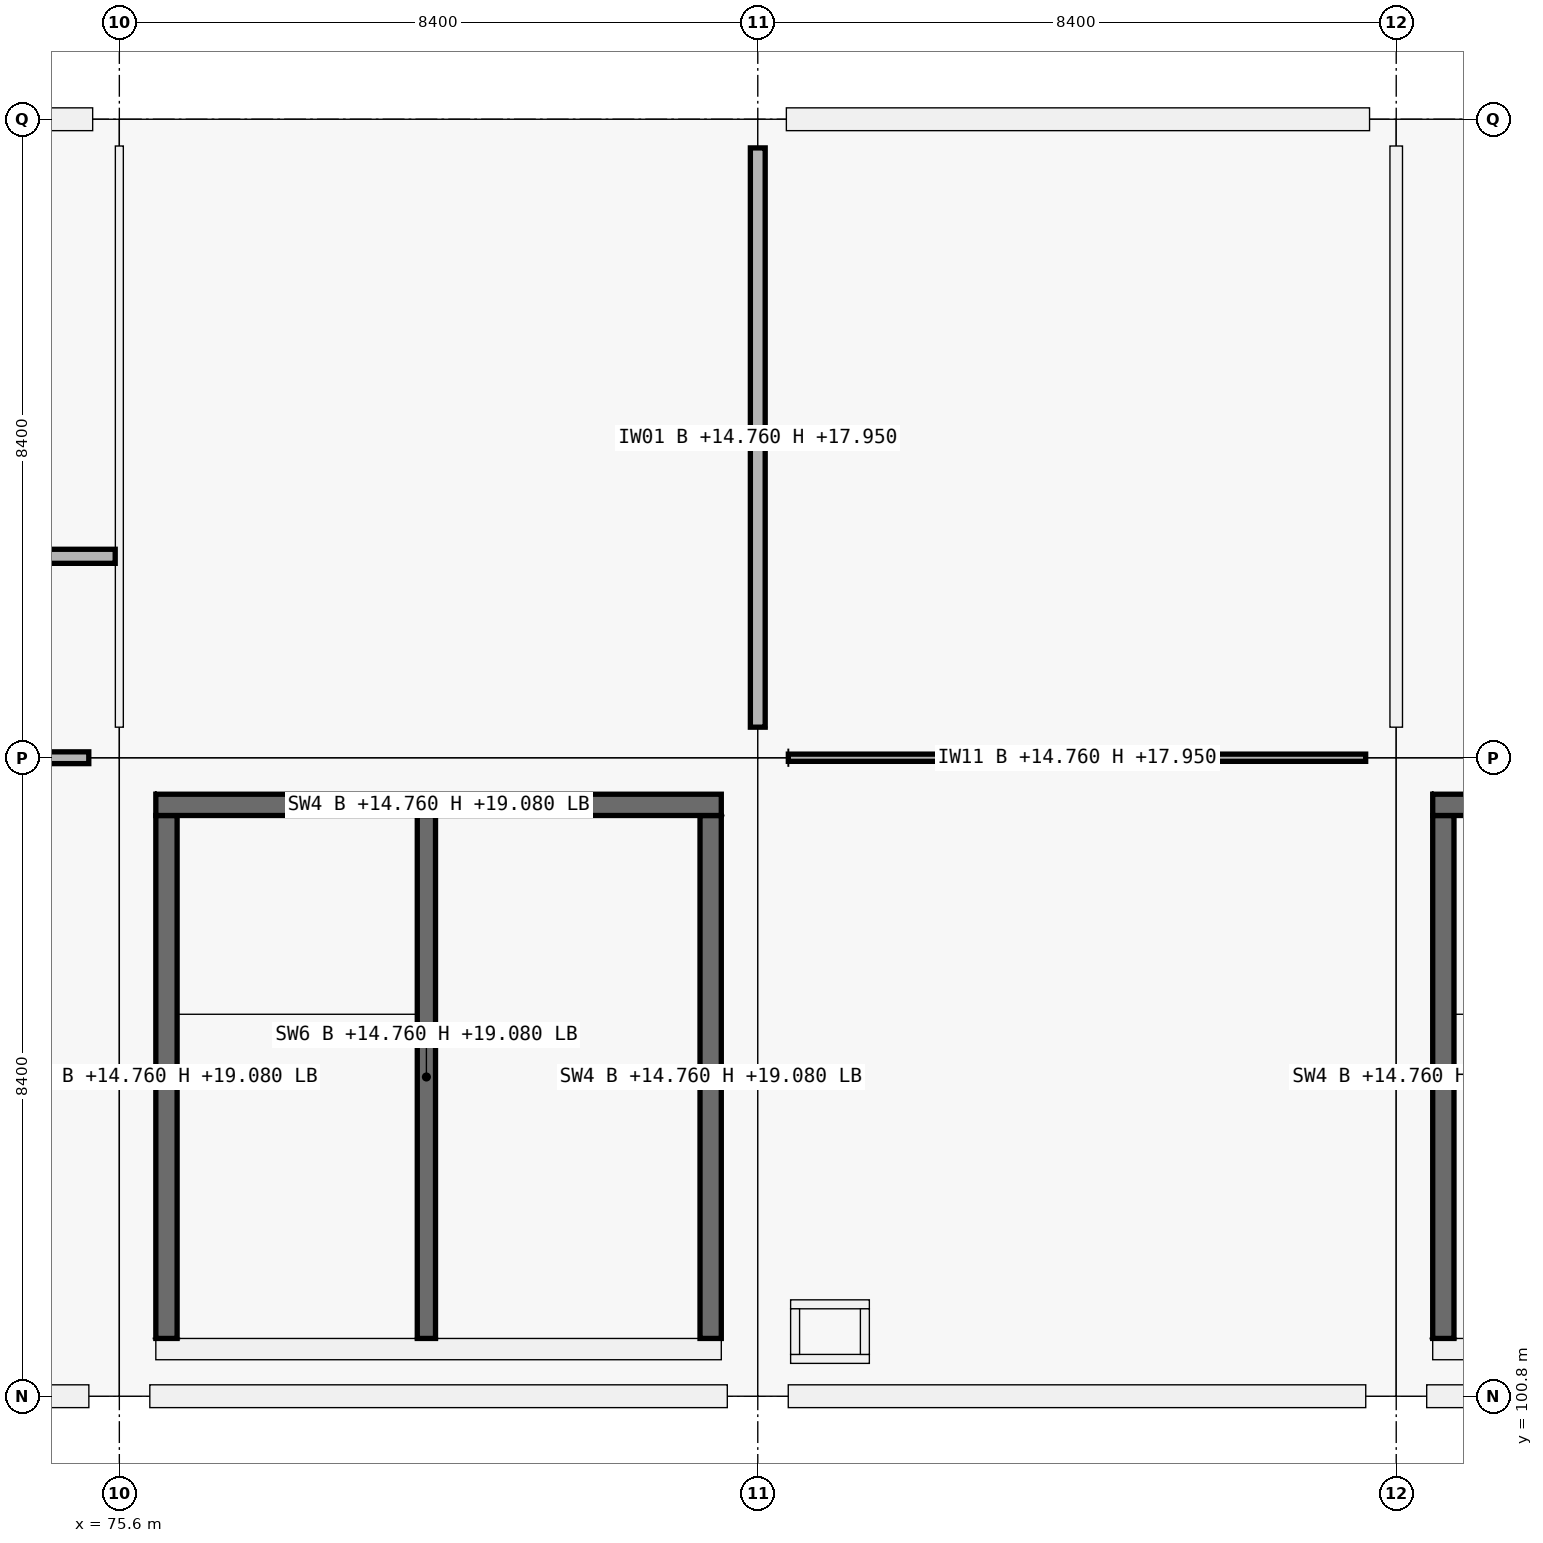
"""IFC4 building model, lengths in metres.
Left out: names, types, materials, properties, quantities, classifications, styles, units other than length and angle.
Written with IfcOpenShell. Run it as: python <this file> out.ifc"""

import sys

from ifc_helpers import new_model, si_unit, direction, frame, frame_2d, origin, origin_2d, place, context, subcontext, project, spatial, rectangle, extrude, element, fill, save


model = new_model("IFC4")
c1 = context("Model", 3, precision=1e-05, world=origin(), true_north=direction((0.0, 1.0)))
c2 = subcontext(c1, "Body", "Model", "MODEL_VIEW")
j1 = project(units=[si_unit("LENGTHUNIT", "METRE"), si_unit("PLANEANGLEUNIT", "RADIAN")], contexts=[c1])
p1 = place(None, origin())
s1 = spatial("IfcSite", under=j1, at=p1, CompositionType="ELEMENT")
p2 = place(p1, origin())
s2 = spatial("IfcBuilding", under=s1, at=p2, CompositionType="ELEMENT")
p3 = place(p2, frame((0.0, 0.0, 14.76)))
s3 = spatial("IfcBuildingStorey", under=s2, at=p3, CompositionType="ELEMENT", Elevation=14.76)
for number, where, z_axis, x_axis in (
    (1, (75.6, 100.8, 0.0), (0.0, 0.0, 1.0), (1.0, 0.0, 0.0)),
    (2, (75.6, 109.2, 0.0), (0.0, 0.0, 1.0), (1.0, 0.0, 0.0)),
):
    element("IfcColumn", number, at=place(p3, frame(where, z_axis=z_axis, x_axis=x_axis)), inside=s3, PredefinedType="COLUMN", context=c2, shape_type="SweptSolid", body=[
        extrude(rectangle(XDim=0.8, YDim=0.8, at=origin_2d()), origin(), (0.0, 0.0, 1.0), 4.32),
    ])
p4 = place(p3, frame((75.6, 117.6, 0.0), z_axis=(0.0, 0.0, 1.0), x_axis=(1.0, 0.0, 0.0)))
e3 = element("IfcColumn", 3, at=p4, inside=s3, PredefinedType="COLUMN", context=c2, shape_type="SweptSolid", body=[
    extrude(rectangle(XDim=0.7, YDim=0.7, at=origin_2d()), origin(), (0.0, 0.0, 1.0), 4.32),
])
for number, where, z_axis, x_axis in (
    (4, (84.0, 100.8, 0.0), (0.0, 0.0, 1.0), (1.0, 0.0, 0.0)),
    (5, (84.0, 109.2, 0.0), (0.0, 0.0, 1.0), (1.0, 0.0, 0.0)),
):
    element("IfcColumn", number, at=place(p3, frame(where, z_axis=z_axis, x_axis=x_axis)), inside=s3, PredefinedType="COLUMN", context=c2, shape_type="SweptSolid", body=[
        extrude(rectangle(XDim=0.8, YDim=0.8, at=origin_2d()), origin(), (0.0, 0.0, 1.0), 4.32),
    ])
p5 = place(p3, frame((84.0, 117.6, 0.0), z_axis=(0.0, 0.0, 1.0), x_axis=(1.0, 0.0, 0.0)))
e6 = element("IfcColumn", 6, at=p5, inside=s3, PredefinedType="COLUMN", context=c2, shape_type="SweptSolid", body=[
    extrude(rectangle(XDim=0.75, YDim=0.75, at=origin_2d()), origin(), (0.0, 0.0, 1.0), 4.32),
])
for number, where, z_axis, x_axis in (
    (7, (92.4, 100.8, 0.0), (0.0, 0.0, 1.0), (1.0, 0.0, 0.0)),
    (8, (92.4, 109.2, 0.0), (0.0, 0.0, 1.0), (1.0, 0.0, 0.0)),
):
    element("IfcColumn", number, at=place(p3, frame(where, z_axis=z_axis, x_axis=x_axis)), inside=s3, PredefinedType="COLUMN", context=c2, shape_type="SweptSolid", body=[
        extrude(rectangle(XDim=0.8, YDim=0.8, at=origin_2d()), origin(), (0.0, 0.0, 1.0), 4.32),
    ])
p6 = place(p3, frame((92.4, 117.6, 0.0), z_axis=(0.0, 0.0, 1.0), x_axis=(1.0, 0.0, 0.0)))
e9 = element("IfcColumn", 9, at=p6, inside=s3, PredefinedType="COLUMN", context=c2, shape_type="SweptSolid", body=[
    extrude(rectangle(XDim=0.7, YDim=0.7, at=origin_2d()), origin(), (0.0, 0.0, 1.0), 4.32),
])
p7 = place(p3, frame((75.199, 100.8, 0.0), z_axis=(0.0, 0.0, 1.0), x_axis=(-1.0, 0.0, 0.0)))
e10 = element("IfcWall", 10, at=p7, inside=s3, PredefinedType="SOLIDWALL", context=c2, shape_type="SweptSolid", body=[
    extrude(rectangle(XDim=7.598, YDim=0.3, at=frame_2d((3.799, 0.0))), origin(), (0.0, 0.0, 1.0), 3.37),
])
p8 = place(p7, frame((2.924, 0.0, 0.9)))
e11 = element("IfcOpeningElement", 11, at=p8, cuts=e10, PredefinedType="OPENING", context=c2, shape_type="SweptSolid", body=[
    extrude(rectangle(XDim=1.75, YDim=1.95, at=frame_2d((0.875, 0.975))), frame((0.0, 0.15, 0.0), z_axis=(0.0, -1.0, 0.0), x_axis=(1.0, 0.0, 0.0)), (0.0, 0.0, 1.0), 0.3),
])
p9 = place(p3, frame((67.576, 117.6, 0.0), z_axis=(0.0, 0.0, 1.0), x_axis=(1.0, 0.0, 0.0)))
e12 = element("IfcWall", 12, at=p9, inside=s3, PredefinedType="SOLIDWALL", context=c2, shape_type="SweptSolid", body=[
    extrude(rectangle(XDim=7.673, YDim=0.3, at=frame_2d((3.836, 0.0))), origin(), (0.0, 0.0, 1.0), 3.37),
])
p10 = place(p9, frame((2.761, 0.0, 0.9)))
e13 = element("IfcOpeningElement", 13, at=p10, cuts=e12, PredefinedType="OPENING", context=c2, shape_type="SweptSolid", body=[
    extrude(rectangle(XDim=2.15, YDim=1.95, at=frame_2d((1.075, 0.975))), frame((0.0, 0.15, 0.0), z_axis=(0.0, -1.0, 0.0), x_axis=(1.0, 0.0, 0.0)), (0.0, 0.0, 1.0), 0.3),
])
p11 = place(p3, frame((83.599, 100.8, 0.0), z_axis=(0.0, 0.0, 1.0), x_axis=(-1.0, 0.0, 0.0)))
e14 = element("IfcWall", 14, at=p11, inside=s3, PredefinedType="SOLIDWALL", context=c2, shape_type="SweptSolid", body=[
    extrude(rectangle(XDim=7.598, YDim=0.3, at=frame_2d((3.799, 0.0))), origin(), (0.0, 0.0, 1.0), 3.37),
])
p12 = place(p3, frame((91.999, 100.8, 0.0), z_axis=(0.0, 0.0, 1.0), x_axis=(-1.0, 0.0, 0.0)))
e15 = element("IfcWall", 15, at=p12, inside=s3, PredefinedType="SOLIDWALL", context=c2, shape_type="SweptSolid", body=[
    extrude(rectangle(XDim=7.598, YDim=0.3, at=frame_2d((3.799, 0.0))), origin(), (0.0, 0.0, 1.0), 3.37),
])
p13 = place(p12, frame((2.824, 0.0, 0.9)))
e16 = element("IfcOpeningElement", 16, at=p13, cuts=e15, PredefinedType="OPENING", context=c2, shape_type="SweptSolid", body=[
    extrude(rectangle(XDim=1.95, YDim=1.6, at=frame_2d((0.975, 0.8))), frame((0.0, 0.15, 0.0), z_axis=(0.0, -1.0, 0.0), x_axis=(1.0, 0.0, 0.0)), (0.0, 0.0, 1.0), 0.3),
])
p14 = place(p3, frame((84.376, 117.6, 0.0), z_axis=(0.0, 0.0, 1.0), x_axis=(1.0, 0.0, 0.0)))
e17 = element("IfcWall", 17, at=p14, inside=s3, PredefinedType="SOLIDWALL", context=c2, shape_type="SweptSolid", body=[
    extrude(rectangle(XDim=7.673, YDim=0.3, at=frame_2d((3.836, 0.0))), origin(), (0.0, 0.0, 1.0), 3.37),
])
p15 = place(p14, frame((2.662, 0.0, 0.9)))
e18 = element("IfcOpeningElement", 18, at=p15, cuts=e17, PredefinedType="OPENING", context=c2, shape_type="SweptSolid", body=[
    extrude(rectangle(XDim=2.35, YDim=1.6, at=frame_2d((1.175, 0.8))), frame((0.0, 0.15, 0.0), z_axis=(0.0, -1.0, 0.0), x_axis=(1.0, 0.0, 0.0)), (0.0, 0.0, 1.0), 0.3),
])
p16 = place(p3, frame((100.399, 100.8, 0.0), z_axis=(0.0, 0.0, 1.0), x_axis=(-1.0, 0.0, 0.0)))
e19 = element("IfcWall", 19, at=p16, inside=s3, PredefinedType="SOLIDWALL", context=c2, shape_type="SweptSolid", body=[
    extrude(rectangle(XDim=7.598, YDim=0.3, at=frame_2d((3.799, 0.0))), origin(), (0.0, 0.0, 1.0), 3.37),
])
p17 = place(p3, frame((83.52, 101.42, 0.0), z_axis=(0.0, 0.0, 1.0), x_axis=(-1.0, 0.0, 0.0)))
e20 = element("IfcWall", 20, at=p17, inside=s3, PredefinedType="SHEAR", context=c2, shape_type="SweptSolid", body=[
    extrude(rectangle(XDim=7.44, YDim=0.28, at=frame_2d((3.72, 0.0))), origin(), (0.0, 0.0, 1.0), 4.32),
])
p18 = place(p3, frame((76.22, 101.56, 0.0), z_axis=(0.0, 0.0, 1.0), x_axis=(0.0, 1.0, 0.0)))
e21 = element("IfcWall", 21, at=p18, inside=s3, PredefinedType="SHEAR", context=c2, shape_type="SweptSolid", body=[
    extrude(rectangle(XDim=6.88, YDim=0.28, at=frame_2d((3.44, 0.0))), origin(), (0.0, 0.0, 1.0), 4.32),
])
p19 = place(p3, frame((76.08, 108.58, 0.0), z_axis=(0.0, 0.0, 1.0), x_axis=(1.0, 0.0, 0.0)))
e22 = element("IfcWall", 22, at=p19, inside=s3, PredefinedType="SHEAR", context=c2, shape_type="SweptSolid", body=[
    extrude(rectangle(XDim=7.44, YDim=0.28, at=frame_2d((3.72, 0.0))), origin(), (0.0, 0.0, 1.0), 4.32),
])
p20 = place(p3, frame((83.38, 108.44, 0.0), z_axis=(0.0, 0.0, 1.0), x_axis=(0.0, -1.0, 0.0)))
e23 = element("IfcWall", 23, at=p20, inside=s3, PredefinedType="SHEAR", context=c2, shape_type="SweptSolid", body=[
    extrude(rectangle(XDim=6.88, YDim=0.28, at=frame_2d((3.44, 0.0))), origin(), (0.0, 0.0, 1.0), 4.32),
])
p21 = place(p20, frame((3.99, 0.0, 0.0)))
e24 = element("IfcOpeningElement", 24, at=p21, cuts=e23, PredefinedType="OPENING", context=c2, shape_type="SweptSolid", body=[
    extrude(rectangle(XDim=1.5, YDim=2.15, at=frame_2d((0.75, 1.075))), frame((0.0, 0.14, 0.0), z_axis=(0.0, -1.0, 0.0), x_axis=(1.0, 0.0, 0.0)), (0.0, 0.0, 1.0), 0.28),
])
p22 = place(p3, frame((79.64, 101.56, 0.0), z_axis=(0.0, 0.0, 1.0), x_axis=(0.0, 1.0, 0.0)))
e25 = element("IfcWall", 25, at=p22, inside=s3, PredefinedType="SHEAR", context=c2, shape_type="SweptSolid", body=[
    extrude(rectangle(XDim=6.88, YDim=0.24, at=frame_2d((3.44, 0.0))), origin(), (0.0, 0.0, 1.0), 4.32),
])
p23 = place(p22, frame((0.12, 0.0, 0.0)))
e26 = element("IfcOpeningElement", 26, at=p23, cuts=e25, PredefinedType="OPENING", context=c2, shape_type="SweptSolid", body=[
    extrude(rectangle(XDim=1.0, YDim=2.15, at=frame_2d((0.5, 1.075))), frame((0.0, 0.12, 0.0), z_axis=(0.0, -1.0, 0.0), x_axis=(1.0, 0.0, 0.0)), (0.0, 0.0, 1.0), 0.24),
])
p24 = place(p3, frame((100.32, 101.42, 0.0), z_axis=(0.0, 0.0, 1.0), x_axis=(-1.0, 0.0, 0.0)))
e27 = element("IfcWall", 27, at=p24, inside=s3, PredefinedType="SHEAR", context=c2, shape_type="SweptSolid", body=[
    extrude(rectangle(XDim=7.44, YDim=0.28, at=frame_2d((3.72, 0.0))), origin(), (0.0, 0.0, 1.0), 4.32),
])
p25 = place(p3, frame((93.02, 101.56, 0.0), z_axis=(0.0, 0.0, 1.0), x_axis=(0.0, 1.0, 0.0)))
e28 = element("IfcWall", 28, at=p25, inside=s3, PredefinedType="SHEAR", context=c2, shape_type="SweptSolid", body=[
    extrude(rectangle(XDim=6.88, YDim=0.28, at=frame_2d((3.44, 0.0))), origin(), (0.0, 0.0, 1.0), 4.32),
])
p26 = place(p3, frame((92.88, 108.58, 0.0), z_axis=(0.0, 0.0, 1.0), x_axis=(1.0, 0.0, 0.0)))
e29 = element("IfcWall", 29, at=p26, inside=s3, PredefinedType="SHEAR", context=c2, shape_type="SweptSolid", body=[
    extrude(rectangle(XDim=7.44, YDim=0.28, at=frame_2d((3.72, 0.0))), origin(), (0.0, 0.0, 1.0), 4.32),
])
for number, where, z_axis, x_axis in (
    (30, (84.432, 101.291, 0.0), (0.0, 0.0, 1.0), (1.0, 0.0, 0.0)),
    (31, (84.432, 102.009, 0.0), (0.0, 0.0, 1.0), (1.0, 0.0, 0.0)),
):
    element("IfcWall", number, at=place(p3, frame(where, z_axis=z_axis, x_axis=x_axis)), inside=s3, PredefinedType="PARTITIONING", context=c2, shape_type="SweptSolid", body=[
        extrude(rectangle(XDim=1.036, YDim=0.118, at=frame_2d((0.518, 0.0))), origin(), (0.0, 0.0, 1.0), 3.35),
    ])
for number, where, z_axis, x_axis in (
    (32, (84.491, 101.35, 0.0), (0.0, 0.0, 1.0), (0.0, 1.0, 0.0)),
    (33, (85.409, 101.35, 0.0), (0.0, 0.0, 1.0), (0.0, 1.0, 0.0)),
):
    element("IfcWall", number, at=place(p3, frame(where, z_axis=z_axis, x_axis=x_axis)), inside=s3, PredefinedType="PARTITIONING", context=c2, shape_type="SweptSolid", body=[
        extrude(rectangle(XDim=0.6, YDim=0.118, at=frame_2d((0.3, 0.0))), origin(), (0.0, 0.0, 1.0), 3.35),
    ])
p27 = place(p3, frame((67.602, 109.2, 0.0), z_axis=(0.0, 0.0, 1.0), x_axis=(1.0, 0.0, 0.0)))
e34 = element("IfcWall", 34, at=p27, inside=s3, PredefinedType="PARTITIONING", context=c2, shape_type="SweptSolid", body=[
    extrude(rectangle(XDim=7.596, YDim=0.155, at=frame_2d((3.798, 0.0))), origin(), (0.0, 0.0, 1.0), 3.19),
])
p28 = place(p3, frame((84.402, 109.2, 0.0), z_axis=(0.0, 0.0, 1.0), x_axis=(1.0, 0.0, 0.0)))
e35 = element("IfcWall", 35, at=p28, inside=s3, PredefinedType="PARTITIONING", context=c2, shape_type="SweptSolid", body=[
    extrude(rectangle(XDim=7.596, YDim=0.095, at=frame_2d((3.798, 0.0))), origin(), (0.0, 0.0, 1.0), 3.19),
])
p29 = place(p28, frame((3.308, 0.0, 0.0)))
e36 = element("IfcOpeningElement", 36, at=p29, cuts=e35, PredefinedType="OPENING", context=c2, shape_type="SweptSolid", body=[
    extrude(rectangle(XDim=0.98, YDim=2.18, at=frame_2d((0.49, 1.09))), frame((0.0, 0.047, 0.0), z_axis=(0.0, -1.0, 0.0), x_axis=(1.0, 0.0, 0.0)), (0.0, 0.0, 1.0), 0.095),
])
p30 = place(p3, frame((75.6, 109.602, 0.0), z_axis=(0.0, 0.0, 1.0), x_axis=(0.0, 1.0, 0.0)))
e37 = element("IfcWall", 37, at=p30, inside=s3, PredefinedType="PARTITIONING", context=c2, shape_type="SweptSolid", body=[
    extrude(rectangle(XDim=7.646, YDim=0.105, at=frame_2d((3.823, 0.0))), origin(), (0.0, 0.0, 1.0), 3.19),
])
p31 = place(p3, frame((84.0, 109.602, 0.0), z_axis=(0.0, 0.0, 1.0), x_axis=(0.0, 1.0, 0.0)))
e38 = element("IfcWall", 38, at=p31, inside=s3, PredefinedType="PARTITIONING", context=c2, shape_type="SweptSolid", body=[
    extrude(rectangle(XDim=7.621, YDim=0.195, at=frame_2d((3.811, 0.0))), origin(), (0.0, 0.0, 1.0), 3.19),
])
p32 = place(p31, frame((3.301, 0.0, 0.0)))
e39 = element("IfcOpeningElement", 39, at=p32, cuts=e38, PredefinedType="OPENING", context=c2, shape_type="SweptSolid", body=[
    extrude(rectangle(XDim=1.02, YDim=2.2, at=frame_2d((0.51, 1.1))), frame((0.0, 0.098, 0.0), z_axis=(0.0, -1.0, 0.0), x_axis=(1.0, 0.0, 0.0)), (0.0, 0.0, 1.0), 0.195),
])
p33 = place(p3, frame((92.4, 109.602, 0.0), z_axis=(0.0, 0.0, 1.0), x_axis=(0.0, 1.0, 0.0)))
e40 = element("IfcWall", 40, at=p33, inside=s3, PredefinedType="PARTITIONING", context=c2, shape_type="SweptSolid", body=[
    extrude(rectangle(XDim=7.646, YDim=0.165, at=frame_2d((3.823, 0.0))), origin(), (0.0, 0.0, 1.0), 3.19),
])
p34 = place(p33, frame((3.323, 0.0, 0.0)))
e41 = element("IfcOpeningElement", 41, at=p34, cuts=e40, PredefinedType="OPENING", context=c2, shape_type="SweptSolid", body=[
    extrude(rectangle(XDim=1.0, YDim=2.2, at=frame_2d((0.5, 1.1))), frame((0.0, 0.083, 0.0), z_axis=(0.0, -1.0, 0.0), x_axis=(1.0, 0.0, 0.0)), (0.0, 0.0, 1.0), 0.165),
])
p35 = place(p3, frame((67.27, 111.85, 0.0), z_axis=(0.0, 0.0, 1.0), x_axis=(1.0, 0.0, 0.0)))
e42 = element("IfcWall", 42, at=p35, inside=s3, PredefinedType="PARTITIONING", context=c2, shape_type="SweptSolid", body=[
    extrude(rectangle(XDim=8.276, YDim=0.185, at=frame_2d((4.138, 0.0))), origin(), (0.0, 0.0, 1.0), 3.19),
])
p36 = place(p13, origin())
e43 = element("IfcWindow", 43, at=p36, inside=s3, PartitioningType="SINGLE_PANEL", PredefinedType="WINDOW", context=c2, shape_type="SweptSolid", body=[
    extrude(rectangle(XDim=1.95, YDim=1.6, at=frame_2d((0.975, 0.8))), frame((0.0, 0.03, 0.0), z_axis=(0.0, -1.0, 0.0), x_axis=(1.0, 0.0, 0.0)), (0.0, 0.0, 1.0), 0.06),
])
fill(e16, e43)
p37 = place(p15, origin())
e44 = element("IfcWindow", 44, at=p37, inside=s3, PartitioningType="SINGLE_PANEL", PredefinedType="WINDOW", context=c2, shape_type="SweptSolid", body=[
    extrude(rectangle(XDim=2.35, YDim=1.6, at=frame_2d((1.175, 0.8))), frame((0.0, 0.03, 0.0), z_axis=(0.0, -1.0, 0.0), x_axis=(1.0, 0.0, 0.0)), (0.0, 0.0, 1.0), 0.06),
])
fill(e18, e44)
p38 = place(p23, origin())
e45 = element("IfcDoor", 45, at=p38, inside=s3, OperationType="SINGLE_SWING_RIGHT", PredefinedType="DOOR", context=c2, shape_type="SweptSolid", body=[
    extrude(rectangle(XDim=1.0, YDim=2.15, at=frame_2d((0.5, 1.075))), frame((0.0, 0.025, 0.0), z_axis=(0.0, -1.0, 0.0), x_axis=(1.0, 0.0, 0.0)), (0.0, 0.0, 1.0), 0.05),
])
fill(e26, e45)
p39 = place(p21, origin())
e46 = element("IfcDoor", 46, at=p39, inside=s3, OperationType="DOUBLE_DOOR_SINGLE_SWING", PredefinedType="DOOR", context=c2, shape_type="SweptSolid", body=[
    extrude(rectangle(XDim=1.5, YDim=2.15, at=frame_2d((0.75, 1.075))), frame((0.0, 0.025, 0.0), z_axis=(0.0, -1.0, 0.0), x_axis=(1.0, 0.0, 0.0)), (0.0, 0.0, 1.0), 0.05),
])
fill(e24, e46)
p40 = place(p29, origin())
e47 = element("IfcDoor", 47, at=p40, inside=s3, OperationType="SINGLE_SWING_LEFT", PredefinedType="DOOR", context=c2, shape_type="SweptSolid", body=[
    extrude(rectangle(XDim=0.98, YDim=2.18, at=frame_2d((0.49, 1.09))), frame((0.0, 0.025, 0.0), z_axis=(0.0, -1.0, 0.0), x_axis=(1.0, 0.0, 0.0)), (0.0, 0.0, 1.0), 0.05),
])
fill(e36, e47)
p41 = place(p32, origin())
e48 = element("IfcDoor", 48, at=p41, inside=s3, OperationType="SINGLE_SWING_LEFT", PredefinedType="DOOR", context=c2, shape_type="SweptSolid", body=[
    extrude(rectangle(XDim=1.02, YDim=2.2, at=frame_2d((0.51, 1.1))), frame((0.0, 0.025, 0.0), z_axis=(0.0, -1.0, 0.0), x_axis=(1.0, 0.0, 0.0)), (0.0, 0.0, 1.0), 0.05),
])
fill(e39, e48)
p42 = place(p34, origin())
e49 = element("IfcDoor", 49, at=p42, inside=s3, OperationType="SINGLE_SWING_RIGHT", PredefinedType="DOOR", context=c2, shape_type="SweptSolid", body=[
    extrude(rectangle(XDim=1.0, YDim=2.2, at=frame_2d((0.5, 1.1))), frame((0.0, 0.025, 0.0), z_axis=(0.0, -1.0, 0.0), x_axis=(1.0, 0.0, 0.0)), (0.0, 0.0, 1.0), 0.05),
])
fill(e41, e49)
save(model, sys.argv[1])
